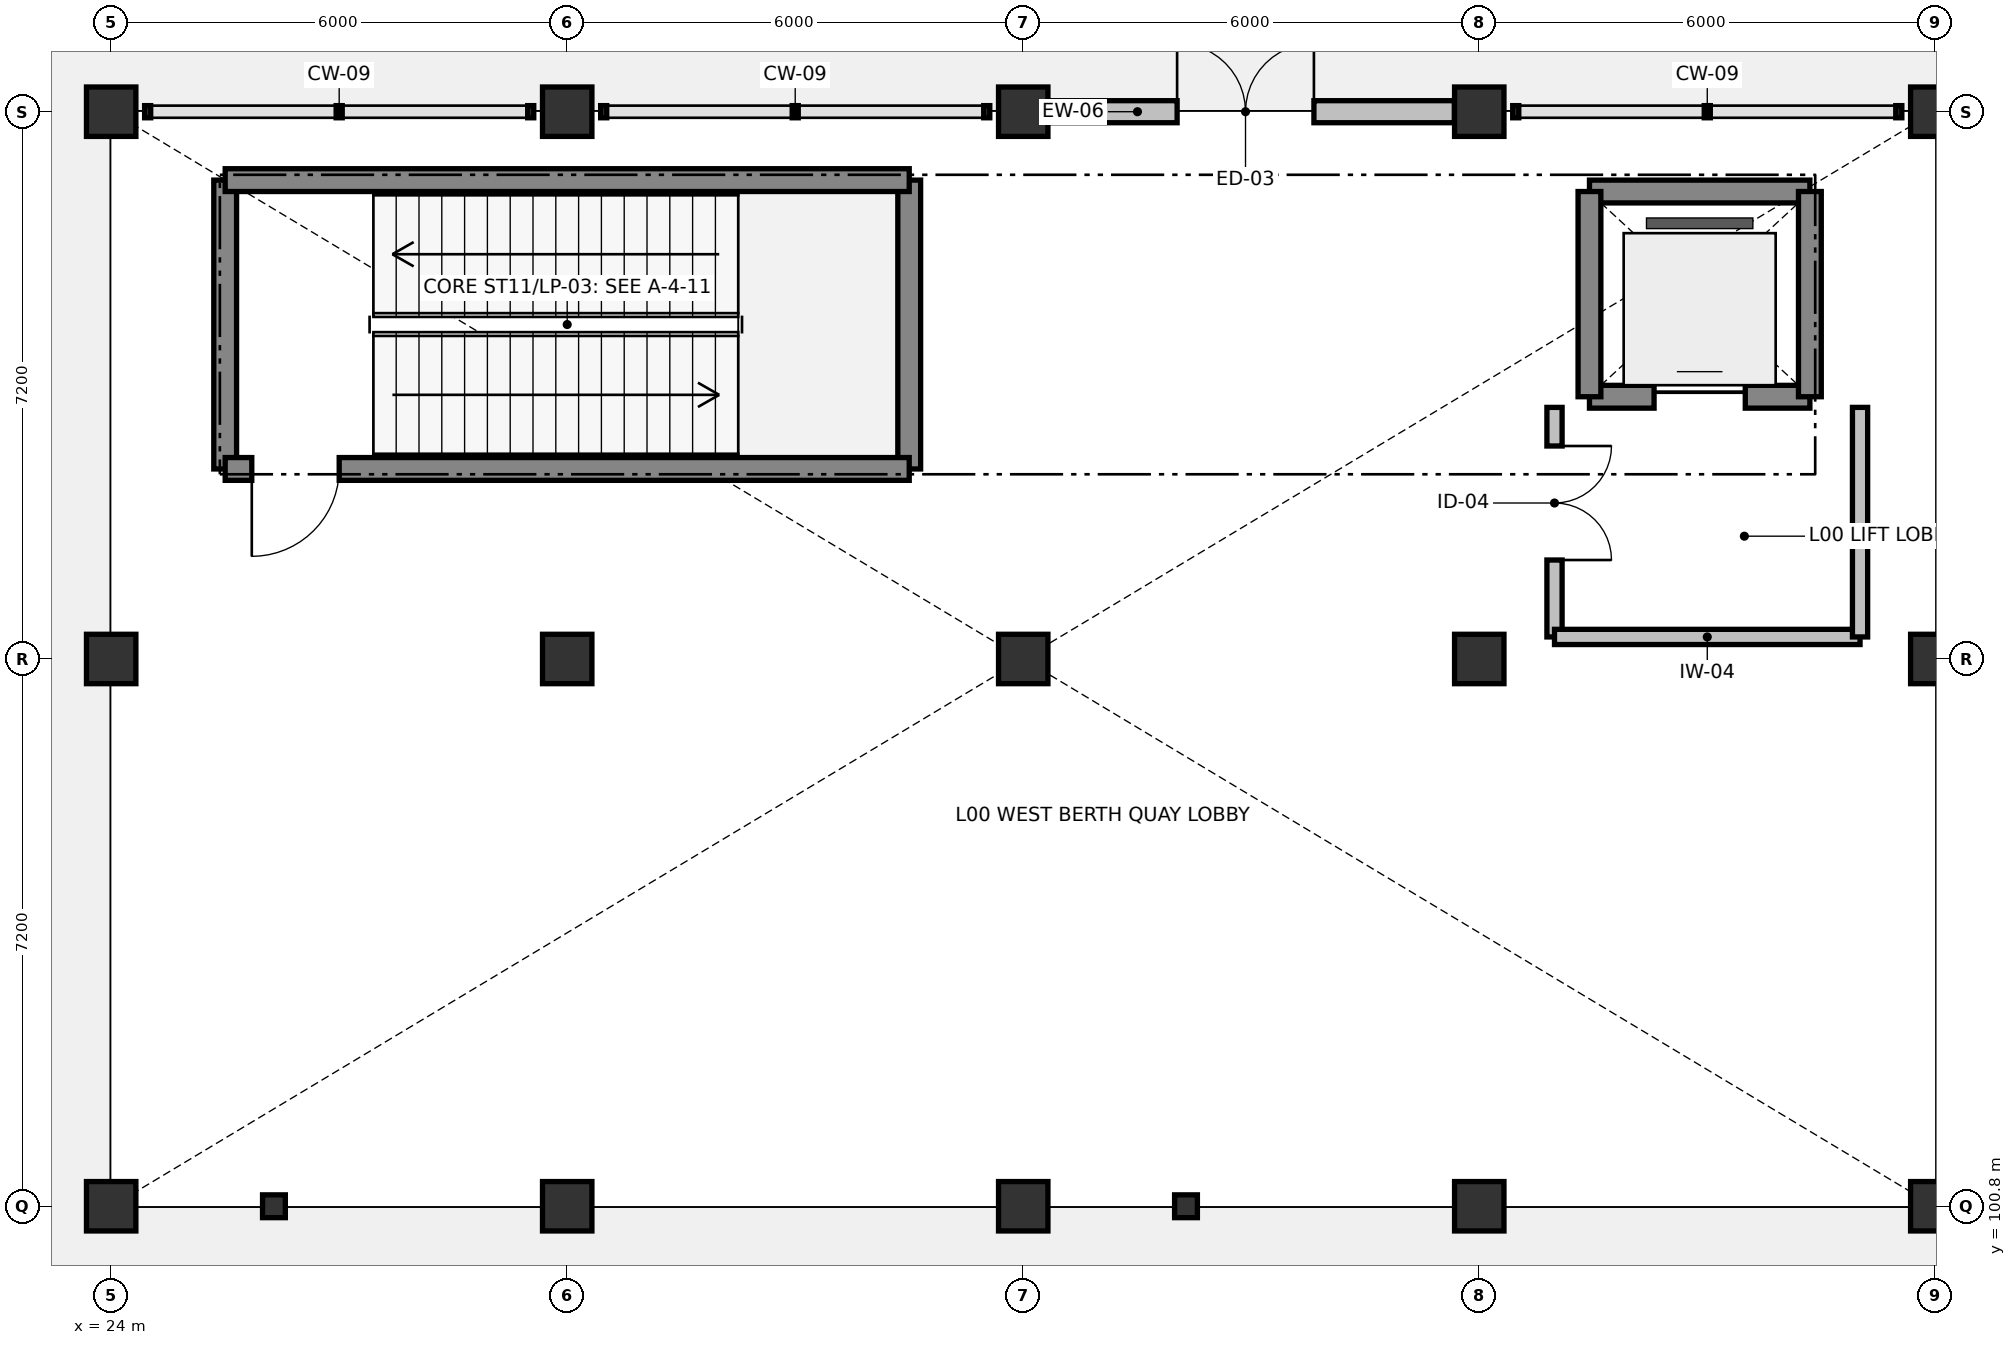
"""IFC4 building model, lengths in metres.
Left out: names, types, materials, properties, quantities, classifications, styles, units other than length and angle.
Written with IfcOpenShell. Run it as: python <this file> out.ifc"""

import sys

from ifc_helpers import new_model, si_unit, direction, frame, frame_2d, origin, origin_2d, place, context, subcontext, project, spatial, rectangle, hollow_rectangle, extrude, element, fill, save


model = new_model("IFC4")
c1 = context("Model", 3, precision=1e-05, world=origin(), true_north=direction((0.0, 1.0)))
c2 = subcontext(c1, "Body", "Model", "MODEL_VIEW")
j1 = project(units=[si_unit("LENGTHUNIT", "METRE"), si_unit("PLANEANGLEUNIT", "RADIAN")], contexts=[c1])
p1 = place(None, origin())
s1 = spatial("IfcSite", under=j1, at=p1, CompositionType="ELEMENT")
p2 = place(p1, origin())
s2 = spatial("IfcBuilding", under=s1, at=p2, CompositionType="ELEMENT")
p3 = place(p2, origin())
s3 = spatial("IfcBuildingStorey", under=s2, at=p3, CompositionType="ELEMENT", Elevation=0.0)
for number, where, z_axis, x_axis in (
    (1, (25.5, 110.5, -0.32), (0.0, 0.0, 1.0), (0.0, 1.0, 0.0)),
    (2, (34.5, 110.5, -0.32), (0.0, 0.0, 1.0), (0.0, 1.0, 0.0)),
):
    element("IfcWall", number, at=place(p3, frame(where, z_axis=z_axis, x_axis=x_axis)), inside=s3, PredefinedType="SHEAR", context=c2, shape_type="SweptSolid", body=[
        extrude(rectangle(XDim=3.8, YDim=0.3, at=frame_2d((1.9, 0.0))), origin(), (0.0, 0.0, 1.0), 6.08),
    ])
for number, where, z_axis, x_axis in (
    (3, (24.0, 100.8, -0.32), (0.0, 0.0, 1.0), (1.0, 0.0, 0.0)),
    (4, (24.0, 108.0, -0.32), (0.0, 0.0, 1.0), (1.0, 0.0, 0.0)),
    (5, (24.0, 115.2, -0.32), (0.0, 0.0, 1.0), (1.0, 0.0, 0.0)),
    (6, (30.0, 100.8, -0.32), (0.0, 0.0, 1.0), (1.0, 0.0, 0.0)),
    (7, (30.0, 108.0, -0.32), (0.0, 0.0, 1.0), (1.0, 0.0, 0.0)),
    (8, (30.0, 115.2, -0.32), (0.0, 0.0, 1.0), (1.0, 0.0, 0.0)),
    (9, (36.0, 100.8, -0.32), (0.0, 0.0, 1.0), (1.0, 0.0, 0.0)),
    (10, (36.0, 108.0, -0.32), (0.0, 0.0, 1.0), (1.0, 0.0, 0.0)),
    (11, (36.0, 115.2, -0.32), (0.0, 0.0, 1.0), (1.0, 0.0, 0.0)),
    (12, (42.0, 100.8, -0.32), (0.0, 0.0, 1.0), (1.0, 0.0, 0.0)),
    (13, (42.0, 108.0, -0.32), (0.0, 0.0, 1.0), (1.0, 0.0, 0.0)),
    (14, (42.0, 115.2, -0.32), (0.0, 0.0, 1.0), (1.0, 0.0, 0.0)),
    (15, (48.0, 100.8, -0.32), (0.0, 0.0, 1.0), (1.0, 0.0, 0.0)),
    (16, (48.0, 108.0, -0.32), (0.0, 0.0, 1.0), (1.0, 0.0, 0.0)),
    (17, (48.0, 115.2, -0.32), (0.0, 0.0, 1.0), (1.0, 0.0, 0.0)),
):
    element("IfcColumn", number, at=place(p3, frame(where, z_axis=z_axis, x_axis=x_axis)), inside=s3, PredefinedType="COLUMN", context=c2, shape_type="SweptSolid", body=[
        extrude(rectangle(XDim=0.65, YDim=0.65, at=origin_2d()), origin(), (0.0, 0.0, 1.0), 6.08),
    ])
for number, where, z_axis, x_axis in (
    (18, (26.142, 100.8, -0.32), (0.0, 0.0, 1.0), (1.0, 0.0, 0.0)),
    (19, (38.142, 100.8, -0.32), (0.0, 0.0, 1.0), (1.0, 0.0, 0.0)),
):
    element("IfcColumn", number, at=place(p3, frame(where, z_axis=z_axis, x_axis=x_axis)), inside=s3, PredefinedType="COLUMN", context=c2, shape_type="SweptSolid", body=[
        extrude(hollow_rectangle(XDim=0.3, YDim=0.3, WallThickness=0.012, InnerFilletRadius=0.012, OuterFilletRadius=0.025, at=origin_2d()), origin(), (0.0, 0.0, 1.0), 5.84),
    ])
p4 = place(p3, frame((36.327, 115.2, 0.0), z_axis=(0.0, 0.0, 1.0), x_axis=(1.0, 0.0, 0.0)))
e20 = element("IfcWall", 20, at=p4, inside=s3, PredefinedType="SOLIDWALL", context=c2, shape_type="SweptSolid", body=[
    extrude(rectangle(XDim=5.346, YDim=0.29, at=frame_2d((2.673, 0.0))), origin(), (0.0, 0.0, 1.0), 4.86),
])
p5 = place(p4, frame((1.698, 0.0, 0.0)))
e21 = element("IfcOpeningElement", 21, at=p5, cuts=e20, PredefinedType="OPENING", context=c2, shape_type="SweptSolid", body=[
    extrude(rectangle(XDim=1.8, YDim=2.25, at=frame_2d((0.9, 1.125))), frame((0.0, 0.155, 0.0), z_axis=(0.0, -1.0, 0.0), x_axis=(1.0, 0.0, 0.0)), (0.0, 0.0, 1.0), 0.31),
])
p6 = place(p3, frame((25.5, 114.3, -0.32), z_axis=(0.0, 0.0, 1.0), x_axis=(1.0, 0.0, 0.0)))
e22 = element("IfcWall", 22, at=p6, inside=s3, PredefinedType="SHEAR", context=c2, shape_type="SweptSolid", body=[
    extrude(rectangle(XDim=9.0, YDim=0.3, at=frame_2d((4.5, 0.0))), origin(), (0.0, 0.0, 1.0), 6.08),
])
p7 = place(p3, frame((25.5, 110.5, -0.32), z_axis=(0.0, 0.0, 1.0), x_axis=(1.0, 0.0, 0.0)))
e23 = element("IfcWall", 23, at=p7, inside=s3, PredefinedType="SHEAR", context=c2, shape_type="SweptSolid", body=[
    extrude(rectangle(XDim=9.0, YDim=0.3, at=frame_2d((4.5, 0.0))), origin(), (0.0, 0.0, 1.0), 6.08),
])
p8 = place(p7, frame((0.35, 0.0, 0.32)))
e24 = element("IfcOpeningElement", 24, at=p8, cuts=e23, PredefinedType="OPENING", context=c2, shape_type="SweptSolid", body=[
    extrude(rectangle(XDim=1.15, YDim=2.15, at=frame_2d((0.575, 1.075))), frame((0.0, 0.16, 0.0), z_axis=(0.0, -1.0, 0.0), x_axis=(1.0, 0.0, 0.0)), (0.0, 0.0, 1.0), 0.32),
])
p9 = place(p3, frame((43.45, 111.45, -0.32), z_axis=(0.0, 0.0, 1.0), x_axis=(1.0, 0.0, 0.0)))
e25 = element("IfcWall", 25, at=p9, inside=s3, PredefinedType="SHEAR", context=c2, shape_type="SweptSolid", body=[
    extrude(rectangle(XDim=2.9, YDim=0.3, at=frame_2d((1.45, 0.0))), origin(), (0.0, 0.0, 1.0), 6.08),
])
p10 = place(p9, frame((0.85, 0.0, 0.32)))
e26 = element("IfcOpeningElement", 26, at=p10, cuts=e25, PredefinedType="OPENING", context=c2, shape_type="SweptSolid", body=[
    extrude(rectangle(XDim=1.2, YDim=2.15, at=frame_2d((0.6, 1.075))), frame((0.0, 0.16, 0.0), z_axis=(0.0, -1.0, 0.0), x_axis=(1.0, 0.0, 0.0)), (0.0, 0.0, 1.0), 0.32),
])
p11 = place(p3, frame((43.45, 114.15, -0.32), z_axis=(0.0, 0.0, 1.0), x_axis=(1.0, 0.0, 0.0)))
e27 = element("IfcWall", 27, at=p11, inside=s3, PredefinedType="SHEAR", context=c2, shape_type="SweptSolid", body=[
    extrude(rectangle(XDim=2.9, YDim=0.3, at=frame_2d((1.45, 0.0))), origin(), (0.0, 0.0, 1.0), 6.08),
])
for number, where, z_axis, x_axis in (
    (28, (43.45, 111.45, -0.32), (0.0, 0.0, 1.0), (0.0, 1.0, 0.0)),
    (29, (46.35, 111.45, -0.32), (0.0, 0.0, 1.0), (0.0, 1.0, 0.0)),
):
    element("IfcWall", number, at=place(p3, frame(where, z_axis=z_axis, x_axis=x_axis)), inside=s3, PredefinedType="SHEAR", context=c2, shape_type="SweptSolid", body=[
        extrude(rectangle(XDim=2.7, YDim=0.3, at=frame_2d((1.35, 0.0))), origin(), (0.0, 0.0, 1.0), 6.08),
    ])
p12 = place(p3, frame((42.99, 111.31, 0.0), z_axis=(0.0, 0.0, 1.0), x_axis=(0.0, -1.0, 0.0)))
e30 = element("IfcWall", 30, at=p12, inside=s3, PredefinedType="PARTITIONING", context=c2, shape_type="SweptSolid", body=[
    extrude(rectangle(XDim=3.02, YDim=0.2, at=frame_2d((1.51, 0.0))), origin(), (0.0, 0.0, 1.0), 5.5),
])
p13 = place(p12, frame((0.508, 0.0, 0.0)))
e31 = element("IfcOpeningElement", 31, at=p13, cuts=e30, PredefinedType="OPENING", context=c2, shape_type="SweptSolid", body=[
    extrude(rectangle(XDim=1.5, YDim=2.2, at=frame_2d((0.75, 1.1))), frame((0.0, 0.11, 0.0), z_axis=(0.0, -1.0, 0.0), x_axis=(1.0, 0.0, 0.0)), (0.0, 0.0, 1.0), 0.22),
])
p14 = place(p3, frame((42.99, 108.29, 0.0), z_axis=(0.0, 0.0, 1.0), x_axis=(1.0, 0.0, 0.0)))
e32 = element("IfcWall", 32, at=p14, inside=s3, PredefinedType="PARTITIONING", context=c2, shape_type="SweptSolid", body=[
    extrude(rectangle(XDim=4.02, YDim=0.2, at=frame_2d((2.01, 0.0))), origin(), (0.0, 0.0, 1.0), 4.86),
])
p15 = place(p3, frame((47.01, 108.29, 0.0), z_axis=(0.0, 0.0, 1.0), x_axis=(0.0, 1.0, 0.0)))
e33 = element("IfcWall", 33, at=p15, inside=s3, PredefinedType="PARTITIONING", context=c2, shape_type="SweptSolid", body=[
    extrude(rectangle(XDim=3.02, YDim=0.2, at=frame_2d((1.51, 0.0))), origin(), (0.0, 0.0, 1.0), 5.5),
])
p16 = place(p5, origin())
e34 = element("IfcDoor", 34, at=p16, inside=s3, OperationType="DOUBLE_SWING_LEFT", PredefinedType="DOOR", context=c2, shape_type="SweptSolid", body=[
    extrude(rectangle(XDim=1.8, YDim=2.25, at=frame_2d((0.9, 1.125))), frame((0.0, 0.025, 0.0), z_axis=(0.0, -1.0, 0.0), x_axis=(1.0, 0.0, 0.0)), (0.0, 0.0, 1.0), 0.05),
])
fill(e21, e34)
p17 = place(p8, frame((1.15, 0.0, 0.0), z_axis=(0.0, 0.0, 1.0), x_axis=(-1.0, 0.0, 0.0)))
e35 = element("IfcDoor", 35, at=p17, inside=s3, OperationType="SINGLE_SWING_RIGHT", PredefinedType="DOOR", context=c2, shape_type="SweptSolid", body=[
    extrude(rectangle(XDim=1.15, YDim=2.15, at=frame_2d((0.575, 1.075))), frame((0.0, 0.025, 0.0), z_axis=(0.0, -1.0, 0.0), x_axis=(1.0, 0.0, 0.0)), (0.0, 0.0, 1.0), 0.05),
])
fill(e24, e35)
p18 = place(p10, origin())
e36 = element("IfcDoor", 36, at=p18, inside=s3, OperationType="SLIDING_TO_LEFT", PredefinedType="DOOR", context=c2, shape_type="SweptSolid", body=[
    extrude(rectangle(XDim=1.2, YDim=2.15, at=frame_2d((0.6, 1.075))), frame((0.0, 0.025, 0.0), z_axis=(0.0, -1.0, 0.0), x_axis=(1.0, 0.0, 0.0)), (0.0, 0.0, 1.0), 0.05),
])
fill(e26, e36)
p19 = place(p13, origin())
e37 = element("IfcDoor", 37, at=p19, inside=s3, OperationType="DOUBLE_SWING_LEFT", PredefinedType="DOOR", context=c2, shape_type="SweptSolid", body=[
    extrude(rectangle(XDim=1.5, YDim=2.2, at=frame_2d((0.75, 1.1))), frame((0.0, 0.025, 0.0), z_axis=(0.0, -1.0, 0.0), x_axis=(1.0, 0.0, 0.0)), (0.0, 0.0, 1.0), 0.05),
])
fill(e31, e37)
save(model, sys.argv[1])
